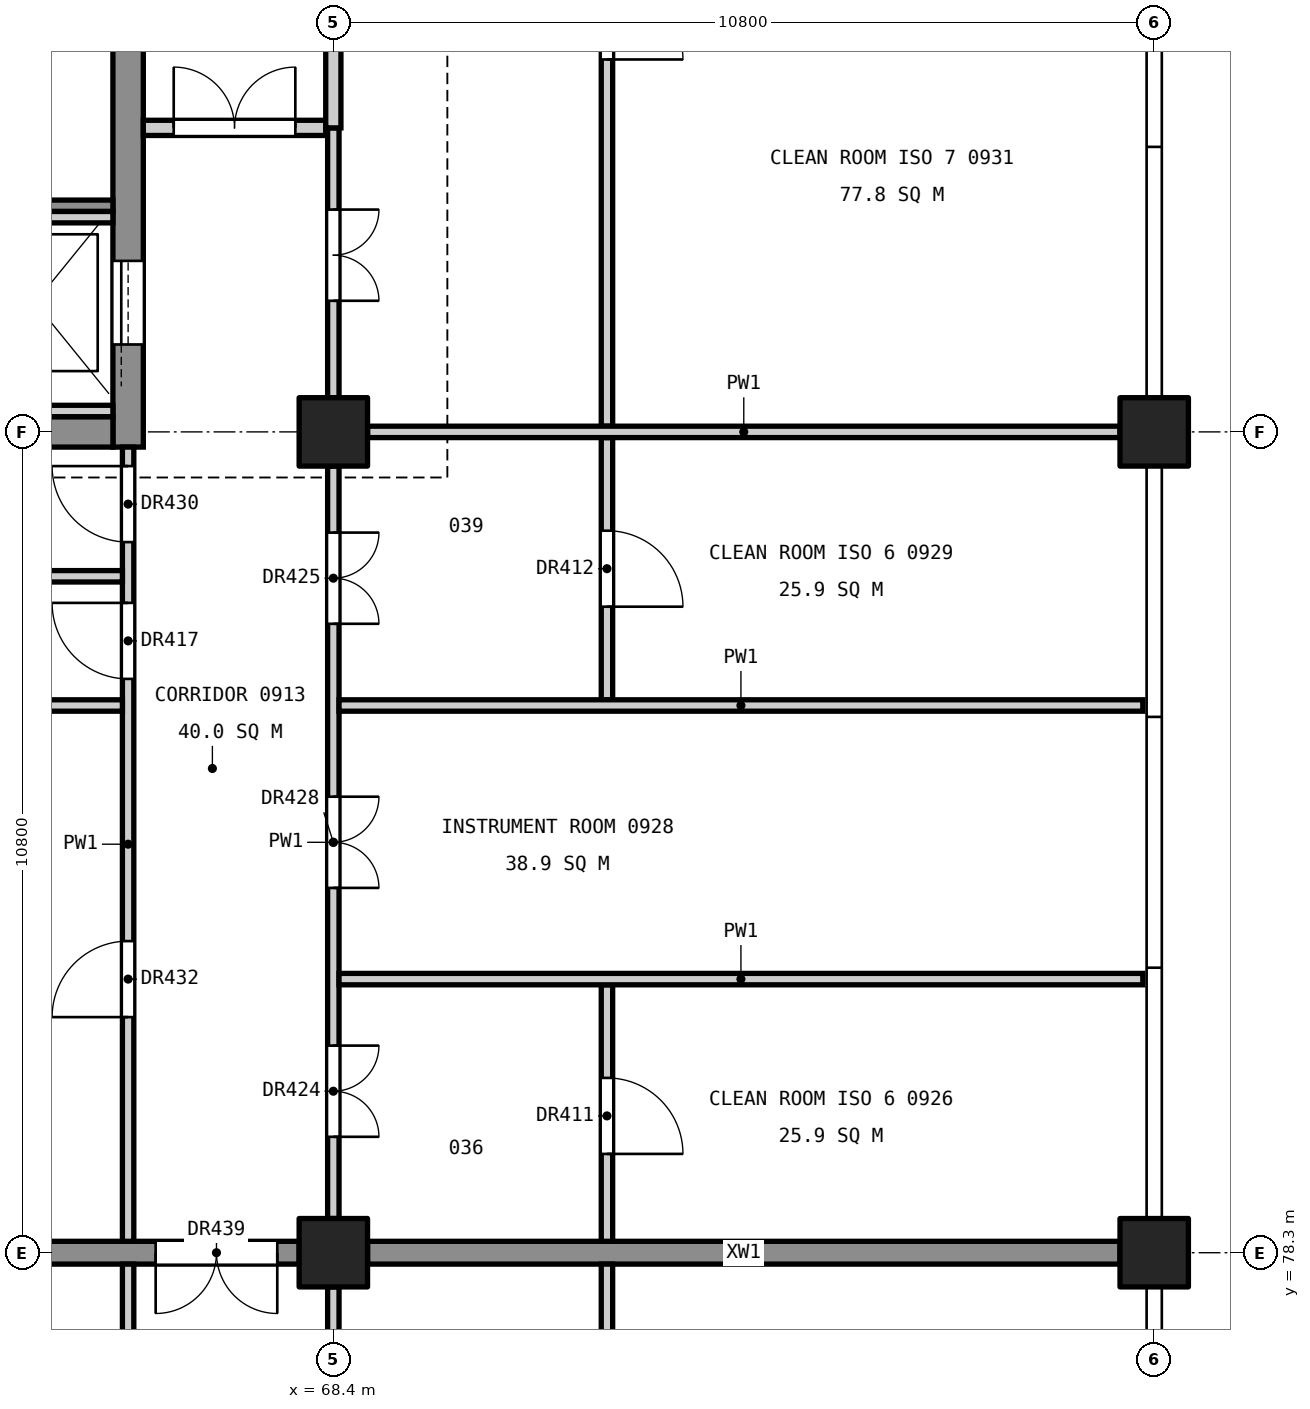
"""IFC4 building model, lengths in metres.
Left out: names, types, materials, properties, quantities, classifications, styles, units other than length and angle.
Written with IfcOpenShell. Run it as: python <this file> out.ifc"""

import sys

from ifc_helpers import new_model, si_unit, direction, frame, frame_2d, origin, origin_2d, place, context, subcontext, project, spatial, rectangle, extrude, element, fill, save


model = new_model("IFC4")
c1 = context("Model", 3, precision=1e-05, world=origin(), true_north=direction((0.0, 1.0)))
c2 = subcontext(c1, "Body", "Model", "MODEL_VIEW")
j1 = project(units=[si_unit("LENGTHUNIT", "METRE"), si_unit("PLANEANGLEUNIT", "RADIAN")], contexts=[c1])
p1 = place(None, origin())
s1 = spatial("IfcSite", under=j1, at=p1, CompositionType="ELEMENT")
p2 = place(p1, origin())
s2 = spatial("IfcBuilding", under=s1, at=p2, CompositionType="ELEMENT")
p3 = place(p2, frame((0.0, 0.0, 46.2)))
s3 = spatial("IfcBuildingStorey", under=s2, at=p3, CompositionType="ELEMENT", Elevation=46.2)
for number, where, z_axis, x_axis in (
    (1, (68.4, 78.3, 0.0), (0.0, 0.0, 1.0), (1.0, 0.0, 0.0)),
    (2, (68.4, 89.1, 0.0), (0.0, 0.0, 1.0), (1.0, 0.0, 0.0)),
    (3, (79.2, 78.3, 0.0), (0.0, 0.0, 1.0), (1.0, 0.0, 0.0)),
    (4, (79.2, 89.1, 0.0), (0.0, 0.0, 1.0), (1.0, 0.0, 0.0)),
):
    element("IfcColumn", number, at=place(p3, frame(where, z_axis=z_axis, x_axis=x_axis)), inside=s3, PredefinedType="COLUMN", context=c2, shape_type="SweptSolid", body=[
        extrude(rectangle(XDim=0.9, YDim=0.9, at=origin_2d()), origin(), (0.0, 0.0, 1.0), 4.8),
    ])
p4 = place(p3, frame((65.7, 88.9, 0.0), z_axis=(0.0, 0.0, 1.0), x_axis=(0.0, 1.0, 0.0)))
e5 = element("IfcWall", 5, at=p4, inside=s3, PredefinedType="SHEAR", context=c2, shape_type="SweptSolid", body=[
    extrude(rectangle(XDim=11.2, YDim=0.4, at=frame_2d((5.6, 0.0))), origin(), (0.0, 0.0, 1.0), 4.55),
])
p5 = place(p4, frame((9.3, 0.0, 0.0)))
e6 = element("IfcOpeningElement", 6, at=p5, cuts=e5, PredefinedType="OPENING", context=c2, shape_type="SweptSolid", body=[
    extrude(rectangle(XDim=1.4, YDim=2.1, at=frame_2d((0.7, 1.05))), frame((0.0, 0.21, 0.0), z_axis=(0.0, -1.0, 0.0), x_axis=(1.0, 0.0, 0.0)), (0.0, 0.0, 1.0), 0.42),
])
p6 = place(p4, frame((1.35, 0.0, 0.0)))
e7 = element("IfcOpeningElement", 7, at=p6, cuts=e5, PredefinedType="OPENING", context=c2, shape_type="SweptSolid", body=[
    extrude(rectangle(XDim=1.1, YDim=2.1, at=frame_2d((0.55, 1.05))), frame((0.0, 0.21, 0.0), z_axis=(0.0, -1.0, 0.0), x_axis=(1.0, 0.0, 0.0)), (0.0, 0.0, 1.0), 0.42),
])
p7 = place(p3, frame((61.4, 89.1, 0.0), z_axis=(0.0, 0.0, 1.0), x_axis=(1.0, 0.0, 0.0)))
e8 = element("IfcWall", 8, at=p7, inside=s3, PredefinedType="SHEAR", context=c2, shape_type="SweptSolid", body=[
    extrude(rectangle(XDim=4.1, YDim=0.4, at=frame_2d((2.05, 0.0))), origin(), (0.0, 0.0, 1.0), 4.55),
])
p8 = place(p3, frame((61.65, 78.3, 0.0), z_axis=(0.0, 0.0, 1.0), x_axis=(1.0, 0.0, 0.0)))
e9 = element("IfcWall", 9, at=p8, inside=s3, PredefinedType="SHEAR", context=c2, shape_type="SweptSolid", body=[
    extrude(rectangle(XDim=6.3, YDim=0.3, at=frame_2d((3.15, 0.0))), origin(), (0.0, 0.0, 1.0), 4.55),
])
p9 = place(p8, frame((4.413, 0.0, 0.0)))
e10 = element("IfcOpeningElement", 10, at=p9, cuts=e9, PredefinedType="OPENING", context=c2, shape_type="SweptSolid", body=[
    extrude(rectangle(XDim=1.6, YDim=2.1, at=frame_2d((0.8, 1.05))), frame((0.0, 0.16, 0.0), z_axis=(0.0, -1.0, 0.0), x_axis=(1.0, 0.0, 0.0)), (0.0, 0.0, 1.0), 0.32),
])
p10 = place(p3, frame((68.85, 78.3, 0.0), z_axis=(0.0, 0.0, 1.0), x_axis=(1.0, 0.0, 0.0)))
e11 = element("IfcWall", 11, at=p10, inside=s3, PredefinedType="SHEAR", context=c2, shape_type="SweptSolid", body=[
    extrude(rectangle(XDim=9.9, YDim=0.3, at=frame_2d((4.95, 0.0))), origin(), (0.0, 0.0, 1.0), 4.55),
])
p11 = place(p3, frame((61.4, 92.075, 0.0), z_axis=(0.0, 0.0, 1.0), x_axis=(1.0, 0.0, 0.0)))
e12 = element("IfcWall", 12, at=p11, inside=s3, PredefinedType="SOLIDWALL", context=c2, shape_type="SweptSolid", body=[
    extrude(rectangle(XDim=4.1, YDim=0.15, at=frame_2d((2.05, 0.0))), origin(), (0.0, 0.0, 1.0), 4.55),
])
for number, where, z_axis, x_axis in (
    (13, (63.65, 91.925, 0.0), (0.0, 0.0, 1.0), (1.0, 0.0, 0.0)),
    (14, (63.65, 89.375, 0.0), (0.0, 0.0, 1.0), (1.0, 0.0, 0.0)),
):
    element("IfcWall", number, at=place(p3, frame(where, z_axis=z_axis, x_axis=x_axis)), inside=s3, PredefinedType="SOLIDWALL", context=c2, shape_type="SweptSolid", body=[
        extrude(rectangle(XDim=1.85, YDim=0.15, at=frame_2d((0.925, 0.0))), origin(), (0.0, 0.0, 1.0), 4.8),
    ])
p12 = place(p3, frame((65.7, 74.9, 0.0), z_axis=(0.0, 0.0, 1.0), x_axis=(0.0, 1.0, 0.0)))
e15 = element("IfcWall", 15, at=p12, inside=s3, PredefinedType="PARTITIONING", context=c2, shape_type="SweptSolid", body=[
    extrude(rectangle(XDim=3.25, YDim=0.15, at=frame_2d((1.625, 0.0))), origin(), (0.0, 0.0, 1.0), 3.55),
])
p13 = place(p12, frame((1.1, 0.0, 0.0)))
e16 = element("IfcOpeningElement", 16, at=p13, cuts=e15, PredefinedType="OPENING", context=c2, shape_type="SweptSolid", body=[
    extrude(rectangle(XDim=1.0, YDim=2.1, at=frame_2d((0.5, 1.05))), frame((0.0, 0.085, 0.0), z_axis=(0.0, -1.0, 0.0), x_axis=(1.0, 0.0, 0.0)), (0.0, 0.0, 1.0), 0.17),
])
p14 = place(p3, frame((65.7, 78.45, 0.0), z_axis=(0.0, 0.0, 1.0), x_axis=(0.0, 1.0, 0.0)))
e17 = element("IfcWall", 17, at=p14, inside=s3, PredefinedType="PARTITIONING", context=c2, shape_type="SweptSolid", body=[
    extrude(rectangle(XDim=10.45, YDim=0.15, at=frame_2d((5.225, 0.0))), origin(), (0.0, 0.0, 1.0), 3.55),
])
p15 = place(p14, frame((7.4, 0.0, 0.0)))
e18 = element("IfcOpeningElement", 18, at=p15, cuts=e17, PredefinedType="OPENING", context=c2, shape_type="SweptSolid", body=[
    extrude(rectangle(XDim=1.0, YDim=2.1, at=frame_2d((0.5, 1.05))), frame((0.0, 0.085, 0.0), z_axis=(0.0, -1.0, 0.0), x_axis=(1.0, 0.0, 0.0)), (0.0, 0.0, 1.0), 0.17),
])
p16 = place(p14, frame((9.2, 0.0, 0.0)))
e19 = element("IfcOpeningElement", 19, at=p16, cuts=e17, PredefinedType="OPENING", context=c2, shape_type="SweptSolid", body=[
    extrude(rectangle(XDim=1.0, YDim=2.1, at=frame_2d((0.5, 1.05))), frame((0.0, 0.085, 0.0), z_axis=(0.0, -1.0, 0.0), x_axis=(1.0, 0.0, 0.0)), (0.0, 0.0, 1.0), 0.17),
])
p17 = place(p14, frame((2.95, 0.0, 0.0)))
e20 = element("IfcOpeningElement", 20, at=p17, cuts=e17, PredefinedType="OPENING", context=c2, shape_type="SweptSolid", body=[
    extrude(rectangle(XDim=1.0, YDim=2.1, at=frame_2d((0.5, 1.05))), frame((0.0, 0.085, 0.0), z_axis=(0.0, -1.0, 0.0), x_axis=(1.0, 0.0, 0.0)), (0.0, 0.0, 1.0), 0.17),
])
p18 = place(p3, frame((61.35, 85.5, 0.0), z_axis=(0.0, 0.0, 1.0), x_axis=(1.0, 0.0, 0.0)))
e21 = element("IfcWall", 21, at=p18, inside=s3, PredefinedType="PARTITIONING", context=c2, shape_type="SweptSolid", body=[
    extrude(rectangle(XDim=4.275, YDim=0.15, at=frame_2d((2.137, 0.0))), origin(), (0.0, 0.0, 1.0), 3.85),
])
p19 = place(p3, frame((61.35, 87.2, 0.0), z_axis=(0.0, 0.0, 1.0), x_axis=(1.0, 0.0, 0.0)))
e22 = element("IfcWall", 22, at=p19, inside=s3, PredefinedType="PARTITIONING", context=c2, shape_type="SweptSolid", body=[
    extrude(rectangle(XDim=4.275, YDim=0.15, at=frame_2d((2.137, 0.0))), origin(), (0.0, 0.0, 1.0), 3.55),
])
p20 = place(p3, frame((65.9, 93.1, 0.0), z_axis=(0.0, 0.0, 1.0), x_axis=(1.0, 0.0, 0.0)))
e23 = element("IfcWall", 23, at=p20, inside=s3, PredefinedType="PARTITIONING", context=c2, shape_type="SweptSolid", body=[
    extrude(rectangle(XDim=2.4, YDim=0.2, at=frame_2d((1.2, 0.0))), origin(), (0.0, 0.0, 1.0), 3.55),
])
p21 = place(p20, frame((0.4, 0.0, 0.0)))
e24 = element("IfcOpeningElement", 24, at=p21, cuts=e23, PredefinedType="OPENING", context=c2, shape_type="SweptSolid", body=[
    extrude(rectangle(XDim=1.6, YDim=2.1, at=frame_2d((0.8, 1.05))), frame((0.0, 0.11, 0.0), z_axis=(0.0, -1.0, 0.0), x_axis=(1.0, 0.0, 0.0)), (0.0, 0.0, 1.0), 0.22),
])
p22 = place(p3, frame((68.4, 70.8, 0.0), z_axis=(0.0, 0.0, 1.0), x_axis=(0.0, 1.0, 0.0)))
e25 = element("IfcWall", 25, at=p22, inside=s3, PredefinedType="PARTITIONING", context=c2, shape_type="SweptSolid", body=[
    extrude(rectangle(XDim=7.05, YDim=0.15, at=frame_2d((3.525, 0.0))), origin(), (0.0, 0.0, 1.0), 3.55),
])
p23 = place(p22, frame((3.025, 0.0, 0.0)))
e26 = element("IfcOpeningElement", 26, at=p23, cuts=e25, PredefinedType="OPENING", context=c2, shape_type="SweptSolid", body=[
    extrude(rectangle(XDim=1.2, YDim=2.1, at=frame_2d((0.6, 1.05))), frame((0.0, 0.085, 0.0), z_axis=(0.0, -1.0, 0.0), x_axis=(1.0, 0.0, 0.0)), (0.0, 0.0, 1.0), 0.17),
])
p24 = place(p3, frame((68.4, 78.75, 0.0), z_axis=(0.0, 0.0, 1.0), x_axis=(0.0, 1.0, 0.0)))
e27 = element("IfcWall", 27, at=p24, inside=s3, PredefinedType="PARTITIONING", context=c2, shape_type="SweptSolid", body=[
    extrude(rectangle(XDim=9.9, YDim=0.15, at=frame_2d((4.95, 0.0))), origin(), (0.0, 0.0, 1.0), 3.55),
])
p25 = place(p24, frame((1.075, 0.0, 0.0)))
e28 = element("IfcOpeningElement", 28, at=p25, cuts=e27, PredefinedType="OPENING", context=c2, shape_type="SweptSolid", body=[
    extrude(rectangle(XDim=1.2, YDim=2.1, at=frame_2d((0.6, 1.05))), frame((0.0, 0.085, 0.0), z_axis=(0.0, -1.0, 0.0), x_axis=(1.0, 0.0, 0.0)), (0.0, 0.0, 1.0), 0.17),
])
p26 = place(p24, frame((7.825, 0.0, 0.0)))
e29 = element("IfcOpeningElement", 29, at=p26, cuts=e27, PredefinedType="OPENING", context=c2, shape_type="SweptSolid", body=[
    extrude(rectangle(XDim=1.2, YDim=2.1, at=frame_2d((0.6, 1.05))), frame((0.0, 0.085, 0.0), z_axis=(0.0, -1.0, 0.0), x_axis=(1.0, 0.0, 0.0)), (0.0, 0.0, 1.0), 0.17),
])
p27 = place(p24, frame((4.35, 0.0, 0.0)))
e30 = element("IfcOpeningElement", 30, at=p27, cuts=e27, PredefinedType="OPENING", context=c2, shape_type="SweptSolid", body=[
    extrude(rectangle(XDim=1.2, YDim=2.1, at=frame_2d((0.6, 1.05))), frame((0.0, 0.085, 0.0), z_axis=(0.0, -1.0, 0.0), x_axis=(1.0, 0.0, 0.0)), (0.0, 0.0, 1.0), 0.17),
])
p28 = place(p3, frame((68.4, 89.55, 0.0), z_axis=(0.0, 0.0, 1.0), x_axis=(0.0, 1.0, 0.0)))
e31 = element("IfcWall", 31, at=p28, inside=s3, PredefinedType="PARTITIONING", context=c2, shape_type="SweptSolid", body=[
    extrude(rectangle(XDim=3.55, YDim=0.15, at=frame_2d((1.775, 0.0))), origin(), (0.0, 0.0, 1.0), 3.55),
])
p29 = place(p28, frame((1.275, 0.0, 0.0)))
e32 = element("IfcOpeningElement", 32, at=p29, cuts=e31, PredefinedType="OPENING", context=c2, shape_type="SweptSolid", body=[
    extrude(rectangle(XDim=1.2, YDim=2.1, at=frame_2d((0.6, 1.05))), frame((0.0, 0.085, 0.0), z_axis=(0.0, -1.0, 0.0), x_axis=(1.0, 0.0, 0.0)), (0.0, 0.0, 1.0), 0.17),
])
p30 = place(p3, frame((68.4, 93.1, 0.0), z_axis=(0.0, 0.0, 1.0), x_axis=(0.0, 1.0, 0.0)))
e33 = element("IfcWall", 33, at=p30, inside=s3, PredefinedType="PARTITIONING", context=c2, shape_type="SweptSolid", body=[
    extrude(rectangle(XDim=6.35, YDim=0.2, at=frame_2d((3.175, 0.0))), origin(), (0.0, 0.0, 1.0), 3.55),
])
p31 = place(p3, frame((72.0, 63.975, 0.0), z_axis=(0.0, 0.0, 1.0), x_axis=(0.0, 1.0, 0.0)))
e34 = element("IfcWall", 34, at=p31, inside=s3, PredefinedType="PARTITIONING", context=c2, shape_type="SweptSolid", body=[
    extrude(rectangle(XDim=14.175, YDim=0.15, at=frame_2d((7.087, 0.0))), origin(), (0.0, 0.0, 1.0), 3.55),
])
p32 = place(p31, frame((6.625, 0.0, 0.0)))
e35 = element("IfcOpeningElement", 35, at=p32, cuts=e34, PredefinedType="OPENING", context=c2, shape_type="SweptSolid", body=[
    extrude(rectangle(XDim=1.0, YDim=2.1, at=frame_2d((0.5, 1.05))), frame((0.0, 0.085, 0.0), z_axis=(0.0, -1.0, 0.0), x_axis=(1.0, 0.0, 0.0)), (0.0, 0.0, 1.0), 0.17),
])
p33 = place(p3, frame((72.0, 78.45, 0.0), z_axis=(0.0, 0.0, 1.0), x_axis=(0.0, 1.0, 0.0)))
e36 = element("IfcWall", 36, at=p33, inside=s3, PredefinedType="PARTITIONING", context=c2, shape_type="SweptSolid", body=[
    extrude(rectangle(XDim=3.375, YDim=0.15, at=frame_2d((1.688, 0.0))), origin(), (0.0, 0.0, 1.0), 3.55),
])
p34 = place(p33, frame((1.15, 0.0, 0.0)))
e37 = element("IfcOpeningElement", 37, at=p34, cuts=e36, PredefinedType="OPENING", context=c2, shape_type="SweptSolid", body=[
    extrude(rectangle(XDim=1.0, YDim=2.1, at=frame_2d((0.5, 1.05))), frame((0.0, 0.085, 0.0), z_axis=(0.0, -1.0, 0.0), x_axis=(1.0, 0.0, 0.0)), (0.0, 0.0, 1.0), 0.17),
])
p35 = place(p3, frame((72.0, 85.575, 0.0), z_axis=(0.0, 0.0, 1.0), x_axis=(0.0, 1.0, 0.0)))
e38 = element("IfcWall", 38, at=p35, inside=s3, PredefinedType="PARTITIONING", context=c2, shape_type="SweptSolid", body=[
    extrude(rectangle(XDim=3.45, YDim=0.15, at=frame_2d((1.725, 0.0))), origin(), (0.0, 0.0, 1.0), 3.55),
])
p36 = place(p35, frame((1.225, 0.0, 0.0)))
e39 = element("IfcOpeningElement", 39, at=p36, cuts=e38, PredefinedType="OPENING", context=c2, shape_type="SweptSolid", body=[
    extrude(rectangle(XDim=1.0, YDim=2.1, at=frame_2d((0.5, 1.05))), frame((0.0, 0.085, 0.0), z_axis=(0.0, -1.0, 0.0), x_axis=(1.0, 0.0, 0.0)), (0.0, 0.0, 1.0), 0.17),
])
p37 = place(p3, frame((72.0, 89.175, 0.0), z_axis=(0.0, 0.0, 1.0), x_axis=(0.0, 1.0, 0.0)))
e40 = element("IfcWall", 40, at=p37, inside=s3, PredefinedType="PARTITIONING", context=c2, shape_type="SweptSolid", body=[
    extrude(rectangle(XDim=10.575, YDim=0.15, at=frame_2d((5.288, 0.0))), origin(), (0.0, 0.0, 1.0), 3.55),
])
p38 = place(p37, frame((4.825, 0.0, 0.0)))
e41 = element("IfcOpeningElement", 41, at=p38, cuts=e40, PredefinedType="OPENING", context=c2, shape_type="SweptSolid", body=[
    extrude(rectangle(XDim=1.0, YDim=2.1, at=frame_2d((0.5, 1.05))), frame((0.0, 0.085, 0.0), z_axis=(0.0, -1.0, 0.0), x_axis=(1.0, 0.0, 0.0)), (0.0, 0.0, 1.0), 0.17),
])
for number, where, z_axis, x_axis in (
    (42, (68.475, 81.9, 0.0), (0.0, 0.0, 1.0), (1.0, 0.0, 0.0)),
    (43, (68.475, 85.5, 0.0), (0.0, 0.0, 1.0), (1.0, 0.0, 0.0)),
):
    element("IfcWall", number, at=place(p3, frame(where, z_axis=z_axis, x_axis=x_axis)), inside=s3, PredefinedType="PARTITIONING", context=c2, shape_type="SweptSolid", body=[
        extrude(rectangle(XDim=10.575, YDim=0.15, at=frame_2d((5.288, 0.0))), origin(), (0.0, 0.0, 1.0), 3.85),
    ])
p39 = place(p3, frame((68.85, 89.1, 0.0), z_axis=(0.0, 0.0, 1.0), x_axis=(1.0, 0.0, 0.0)))
e44 = element("IfcWall", 44, at=p39, inside=s3, PredefinedType="PARTITIONING", context=c2, shape_type="SweptSolid", body=[
    extrude(rectangle(XDim=9.9, YDim=0.15, at=frame_2d((4.95, 0.0))), origin(), (0.0, 0.0, 1.0), 3.85),
])
p40 = place(p6, origin())
e45 = element("IfcDoor", 45, at=p40, inside=s3, OperationType="SLIDING_TO_LEFT", PredefinedType="DOOR", context=c2, shape_type="SweptSolid", body=[
    extrude(rectangle(XDim=1.1, YDim=2.1, at=frame_2d((0.55, 1.05))), frame((0.0, 0.025, 0.0), z_axis=(0.0, -1.0, 0.0), x_axis=(1.0, 0.0, 0.0)), (0.0, 0.0, 1.0), 0.05),
])
fill(e7, e45)
p41 = place(p34, frame((1.0, 0.0, 0.0), z_axis=(0.0, 0.0, 1.0), x_axis=(-1.0, 0.0, 0.0)))
e46 = element("IfcDoor", 46, at=p41, inside=s3, OperationType="SINGLE_SWING_RIGHT", PredefinedType="DOOR", context=c2, shape_type="SweptSolid", body=[
    extrude(rectangle(XDim=1.0, YDim=2.1, at=frame_2d((0.5, 1.05))), frame((0.0, 0.025, 0.0), z_axis=(0.0, -1.0, 0.0), x_axis=(1.0, 0.0, 0.0)), (0.0, 0.0, 1.0), 0.05),
])
fill(e37, e46)
p42 = place(p36, frame((1.0, 0.0, 0.0), z_axis=(0.0, 0.0, 1.0), x_axis=(-1.0, 0.0, 0.0)))
e47 = element("IfcDoor", 47, at=p42, inside=s3, OperationType="SINGLE_SWING_RIGHT", PredefinedType="DOOR", context=c2, shape_type="SweptSolid", body=[
    extrude(rectangle(XDim=1.0, YDim=2.1, at=frame_2d((0.5, 1.05))), frame((0.0, 0.025, 0.0), z_axis=(0.0, -1.0, 0.0), x_axis=(1.0, 0.0, 0.0)), (0.0, 0.0, 1.0), 0.05),
])
fill(e39, e47)
p43 = place(p38, frame((1.0, 0.0, 0.0), z_axis=(0.0, 0.0, 1.0), x_axis=(-1.0, 0.0, 0.0)))
e48 = element("IfcDoor", 48, at=p43, inside=s3, OperationType="SINGLE_SWING_RIGHT", PredefinedType="DOOR", context=c2, shape_type="SweptSolid", body=[
    extrude(rectangle(XDim=1.0, YDim=2.1, at=frame_2d((0.5, 1.05))), frame((0.0, 0.025, 0.0), z_axis=(0.0, -1.0, 0.0), x_axis=(1.0, 0.0, 0.0)), (0.0, 0.0, 1.0), 0.05),
])
fill(e41, e48)
p44 = place(p15, origin())
e49 = element("IfcDoor", 49, at=p44, inside=s3, OperationType="SINGLE_SWING_RIGHT", PredefinedType="DOOR", context=c2, shape_type="SweptSolid", body=[
    extrude(rectangle(XDim=1.0, YDim=2.1, at=frame_2d((0.5, 1.05))), frame((0.0, 0.025, 0.0), z_axis=(0.0, -1.0, 0.0), x_axis=(1.0, 0.0, 0.0)), (0.0, 0.0, 1.0), 0.05),
])
fill(e18, e49)
p45 = place(p25, frame((1.2, 0.0, 0.0), z_axis=(0.0, 0.0, 1.0), x_axis=(-1.0, 0.0, 0.0)))
e50 = element("IfcDoor", 50, at=p45, inside=s3, OperationType="DOUBLE_DOOR_SINGLE_SWING", PredefinedType="DOOR", context=c2, shape_type="SweptSolid", body=[
    extrude(rectangle(XDim=1.2, YDim=2.1, at=frame_2d((0.6, 1.05))), frame((0.0, 0.025, 0.0), z_axis=(0.0, -1.0, 0.0), x_axis=(1.0, 0.0, 0.0)), (0.0, 0.0, 1.0), 0.05),
])
fill(e28, e50)
p46 = place(p26, frame((1.2, 0.0, 0.0), z_axis=(0.0, 0.0, 1.0), x_axis=(-1.0, 0.0, 0.0)))
e51 = element("IfcDoor", 51, at=p46, inside=s3, OperationType="DOUBLE_DOOR_SINGLE_SWING", PredefinedType="DOOR", context=c2, shape_type="SweptSolid", body=[
    extrude(rectangle(XDim=1.2, YDim=2.1, at=frame_2d((0.6, 1.05))), frame((0.0, 0.025, 0.0), z_axis=(0.0, -1.0, 0.0), x_axis=(1.0, 0.0, 0.0)), (0.0, 0.0, 1.0), 0.05),
])
fill(e29, e51)
p47 = place(p29, frame((1.2, 0.0, 0.0), z_axis=(0.0, 0.0, 1.0), x_axis=(-1.0, 0.0, 0.0)))
e52 = element("IfcDoor", 52, at=p47, inside=s3, OperationType="DOUBLE_DOOR_SINGLE_SWING", PredefinedType="DOOR", context=c2, shape_type="SweptSolid", body=[
    extrude(rectangle(XDim=1.2, YDim=2.1, at=frame_2d((0.6, 1.05))), frame((0.0, 0.025, 0.0), z_axis=(0.0, -1.0, 0.0), x_axis=(1.0, 0.0, 0.0)), (0.0, 0.0, 1.0), 0.05),
])
fill(e32, e52)
p48 = place(p27, frame((1.2, 0.0, 0.0), z_axis=(0.0, 0.0, 1.0), x_axis=(-1.0, 0.0, 0.0)))
e53 = element("IfcDoor", 53, at=p48, inside=s3, OperationType="DOUBLE_DOOR_SINGLE_SWING", PredefinedType="DOOR", context=c2, shape_type="SweptSolid", body=[
    extrude(rectangle(XDim=1.2, YDim=2.1, at=frame_2d((0.6, 1.05))), frame((0.0, 0.025, 0.0), z_axis=(0.0, -1.0, 0.0), x_axis=(1.0, 0.0, 0.0)), (0.0, 0.0, 1.0), 0.05),
])
fill(e30, e53)
p49 = place(p16, origin())
e54 = element("IfcDoor", 54, at=p49, inside=s3, OperationType="SINGLE_SWING_RIGHT", PredefinedType="DOOR", context=c2, shape_type="SweptSolid", body=[
    extrude(rectangle(XDim=1.0, YDim=2.1, at=frame_2d((0.5, 1.05))), frame((0.0, 0.025, 0.0), z_axis=(0.0, -1.0, 0.0), x_axis=(1.0, 0.0, 0.0)), (0.0, 0.0, 1.0), 0.05),
])
fill(e19, e54)
p50 = place(p17, origin())
e55 = element("IfcDoor", 55, at=p50, inside=s3, OperationType="SINGLE_SWING_LEFT", PredefinedType="DOOR", context=c2, shape_type="SweptSolid", body=[
    extrude(rectangle(XDim=1.0, YDim=2.1, at=frame_2d((0.5, 1.05))), frame((0.0, 0.025, 0.0), z_axis=(0.0, -1.0, 0.0), x_axis=(1.0, 0.0, 0.0)), (0.0, 0.0, 1.0), 0.05),
])
fill(e20, e55)
p51 = place(p21, origin())
e56 = element("IfcDoor", 56, at=p51, inside=s3, OperationType="DOUBLE_DOOR_SINGLE_SWING", PredefinedType="DOOR", context=c2, shape_type="SweptSolid", body=[
    extrude(rectangle(XDim=1.6, YDim=2.1, at=frame_2d((0.8, 1.05))), frame((0.0, 0.025, 0.0), z_axis=(0.0, -1.0, 0.0), x_axis=(1.0, 0.0, 0.0)), (0.0, 0.0, 1.0), 0.05),
])
fill(e24, e56)
p52 = place(p9, frame((1.6, 0.0, 0.0), z_axis=(0.0, 0.0, 1.0), x_axis=(-1.0, 0.0, 0.0)))
e57 = element("IfcDoor", 57, at=p52, inside=s3, OperationType="DOUBLE_DOOR_SINGLE_SWING", PredefinedType="DOOR", context=c2, shape_type="SweptSolid", body=[
    extrude(rectangle(XDim=1.6, YDim=2.1, at=frame_2d((0.8, 1.05))), frame((0.0, 0.025, 0.0), z_axis=(0.0, -1.0, 0.0), x_axis=(1.0, 0.0, 0.0)), (0.0, 0.0, 1.0), 0.05),
])
fill(e10, e57)
save(model, sys.argv[1])
